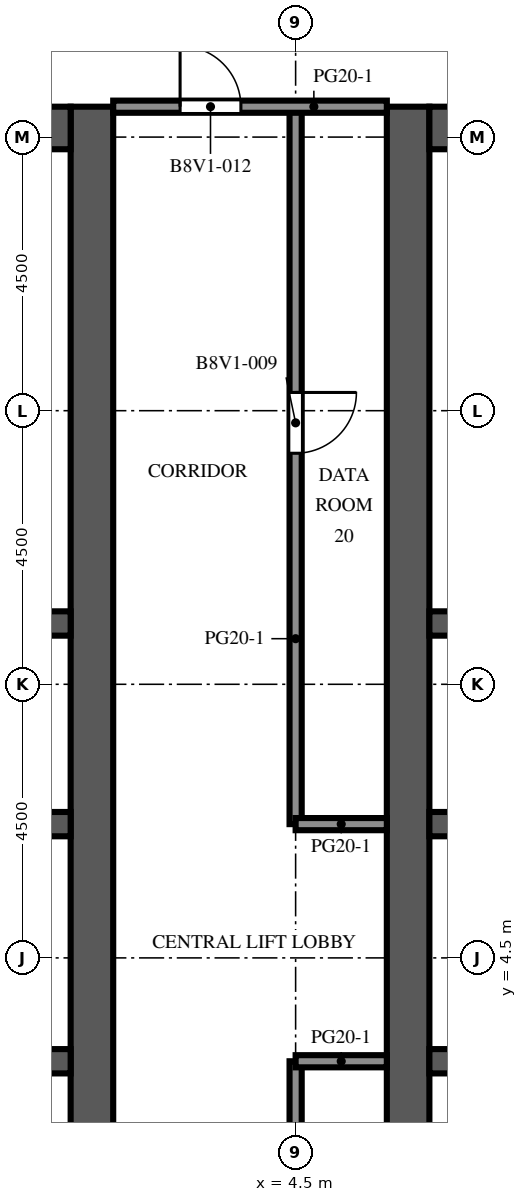
"""IFC4 building model, lengths in metres.
Left out: names, types, materials, properties, quantities, classifications, styles, units other than length and angle.
Written with IfcOpenShell. Run it as: python <this file> out.ifc"""

import sys

from ifc_helpers import new_model, si_unit, direction, frame, frame_2d, origin, place, context, subcontext, project, spatial, rectangle, extrude, element, fill, save


model = new_model("IFC4")
c1 = context("Model", 3, precision=1e-05, world=origin(), true_north=direction((0.0, 1.0)))
c2 = subcontext(c1, "Body", "Model", "MODEL_VIEW")
j1 = project(units=[si_unit("LENGTHUNIT", "METRE"), si_unit("PLANEANGLEUNIT", "RADIAN")], contexts=[c1])
p1 = place(None, origin())
s1 = spatial("IfcSite", under=j1, at=p1, CompositionType="ELEMENT")
p2 = place(p1, origin())
s2 = spatial("IfcBuilding", under=s1, at=p2, CompositionType="ELEMENT")
p3 = place(p2, frame((0.0, 0.0, 274.5)))
s3 = spatial("IfcBuildingStorey", under=s2, at=p3, CompositionType="ELEMENT", Elevation=274.5)
p4 = place(p3, frame((1.15, -9.0, 0.0), z_axis=(0.0, 0.0, 1.0), x_axis=(0.0, 1.0, 0.0)))
e1 = element("IfcWall", 1, at=p4, inside=s3, PredefinedType="SHEAR", context=c2, shape_type="SweptSolid", body=[
    extrude(rectangle(XDim=27.5, YDim=0.7, at=frame_2d((13.75, 0.0))), origin(), (0.0, 0.0, 1.0), 4.1),
])
p5 = place(p4, frame((12.55, 0.0, 0.0)))
e2 = element("IfcOpeningElement", 2, at=p5, cuts=e1, PredefinedType="OPENING", context=c2, shape_type="SweptSolid", body=[
    extrude(rectangle(XDim=2.4, YDim=2.4, at=frame_2d((1.2, 1.2))), frame((0.0, 0.36, 0.0), z_axis=(0.0, -1.0, 0.0), x_axis=(1.0, 0.0, 0.0)), (0.0, 0.0, 1.0), 0.72),
])
p6 = place(p4, frame((3.9, 0.0, 0.0)))
e3 = element("IfcOpeningElement", 3, at=p6, cuts=e1, PredefinedType="OPENING", context=c2, shape_type="SweptSolid", body=[
    extrude(rectangle(XDim=1.2, YDim=2.1, at=frame_2d((0.6, 1.05))), frame((0.0, 0.36, 0.0), z_axis=(0.0, -1.0, 0.0), x_axis=(1.0, 0.0, 0.0)), (0.0, 0.0, 1.0), 0.72),
])
p7 = place(p4, frame((19.46, 0.0, 0.0)))
e4 = element("IfcOpeningElement", 4, at=p7, cuts=e1, PredefinedType="OPENING", context=c2, shape_type="SweptSolid", body=[
    extrude(rectangle(XDim=1.0, YDim=2.1, at=frame_2d((0.5, 1.05))), frame((0.0, 0.36, 0.0), z_axis=(0.0, -1.0, 0.0), x_axis=(1.0, 0.0, 0.0)), (0.0, 0.0, 1.0), 0.72),
])
p8 = place(p4, frame((21.17, 0.0, 0.0)))
e5 = element("IfcOpeningElement", 5, at=p8, cuts=e1, PredefinedType="OPENING", context=c2, shape_type="SweptSolid", body=[
    extrude(rectangle(XDim=1.0, YDim=2.1, at=frame_2d((0.5, 1.05))), frame((0.0, 0.36, 0.0), z_axis=(0.0, -1.0, 0.0), x_axis=(1.0, 0.0, 0.0)), (0.0, 0.0, 1.0), 0.72),
])
p9 = place(p4, frame((23.26, 0.0, 0.0)))
e6 = element("IfcOpeningElement", 6, at=p9, cuts=e1, PredefinedType="OPENING", context=c2, shape_type="SweptSolid", body=[
    extrude(rectangle(XDim=1.0, YDim=2.1, at=frame_2d((0.5, 1.05))), frame((0.0, 0.36, 0.0), z_axis=(0.0, -1.0, 0.0), x_axis=(1.0, 0.0, 0.0)), (0.0, 0.0, 1.0), 0.72),
])
p10 = place(p4, frame((25.35, 0.0, 0.0)))
e7 = element("IfcOpeningElement", 7, at=p10, cuts=e1, PredefinedType="OPENING", context=c2, shape_type="SweptSolid", body=[
    extrude(rectangle(XDim=1.0, YDim=2.1, at=frame_2d((0.5, 1.05))), frame((0.0, 0.36, 0.0), z_axis=(0.0, -1.0, 0.0), x_axis=(1.0, 0.0, 0.0)), (0.0, 0.0, 1.0), 0.72),
])
p11 = place(p3, frame((-9.8, 18.15, 0.0), z_axis=(0.0, 0.0, 1.0), x_axis=(1.0, 0.0, 0.0)))
e8 = element("IfcWall", 8, at=p11, inside=s3, PredefinedType="SHEAR", context=c2, shape_type="SweptSolid", body=[
    extrude(rectangle(XDim=10.6, YDim=0.7, at=frame_2d((5.3, 0.0))), origin(), (0.0, 0.0, 1.0), 4.1),
])
p12 = place(p3, frame((-9.8, 2.8, 0.0), z_axis=(0.0, 0.0, 1.0), x_axis=(1.0, 0.0, 0.0)))
e9 = element("IfcWall", 9, at=p12, inside=s3, PredefinedType="SHEAR", context=c2, shape_type="SweptSolid", body=[
    extrude(rectangle(XDim=10.6, YDim=0.4, at=frame_2d((5.3, 0.0))), origin(), (0.0, 0.0, 1.0), 4.1),
])
p13 = place(p12, frame((0.688, 0.0, 0.0)))
e10 = element("IfcOpeningElement", 10, at=p13, cuts=e9, PredefinedType="OPENING", context=c2, shape_type="SweptSolid", body=[
    extrude(rectangle(XDim=1.1, YDim=2.1, at=frame_2d((0.55, 1.05))), frame((0.0, 0.21, 0.0), z_axis=(0.0, -1.0, 0.0), x_axis=(1.0, 0.0, 0.0)), (0.0, 0.0, 1.0), 0.42),
])
p14 = place(p12, frame((3.438, 0.0, 0.0)))
e11 = element("IfcOpeningElement", 11, at=p14, cuts=e9, PredefinedType="OPENING", context=c2, shape_type="SweptSolid", body=[
    extrude(rectangle(XDim=1.1, YDim=2.1, at=frame_2d((0.55, 1.05))), frame((0.0, 0.21, 0.0), z_axis=(0.0, -1.0, 0.0), x_axis=(1.0, 0.0, 0.0)), (0.0, 0.0, 1.0), 0.42),
])
p15 = place(p12, frame((6.113, 0.0, 0.0)))
e12 = element("IfcOpeningElement", 12, at=p15, cuts=e9, PredefinedType="OPENING", context=c2, shape_type="SweptSolid", body=[
    extrude(rectangle(XDim=1.0, YDim=2.1, at=frame_2d((0.5, 1.05))), frame((0.0, 0.21, 0.0), z_axis=(0.0, -1.0, 0.0), x_axis=(1.0, 0.0, 0.0)), (0.0, 0.0, 1.0), 0.42),
])
p16 = place(p12, frame((8.863, 0.0, 0.0)))
e13 = element("IfcOpeningElement", 13, at=p16, cuts=e9, PredefinedType="OPENING", context=c2, shape_type="SweptSolid", body=[
    extrude(rectangle(XDim=1.0, YDim=2.1, at=frame_2d((0.5, 1.05))), frame((0.0, 0.21, 0.0), z_axis=(0.0, -1.0, 0.0), x_axis=(1.0, 0.0, 0.0)), (0.0, 0.0, 1.0), 0.42),
])
p17 = place(p3, frame((-9.8, 6.7, 0.0), z_axis=(0.0, 0.0, 1.0), x_axis=(1.0, 0.0, 0.0)))
e14 = element("IfcWall", 14, at=p17, inside=s3, PredefinedType="SHEAR", context=c2, shape_type="SweptSolid", body=[
    extrude(rectangle(XDim=10.6, YDim=0.4, at=frame_2d((5.3, 0.0))), origin(), (0.0, 0.0, 1.0), 4.1),
])
p18 = place(p17, frame((3.438, 0.0, 0.0)))
e15 = element("IfcOpeningElement", 15, at=p18, cuts=e14, PredefinedType="OPENING", context=c2, shape_type="SweptSolid", body=[
    extrude(rectangle(XDim=1.1, YDim=2.1, at=frame_2d((0.55, 1.05))), frame((0.0, 0.21, 0.0), z_axis=(0.0, -1.0, 0.0), x_axis=(1.0, 0.0, 0.0)), (0.0, 0.0, 1.0), 0.42),
])
p19 = place(p17, frame((6.062, 0.0, 0.0)))
e16 = element("IfcOpeningElement", 16, at=p19, cuts=e14, PredefinedType="OPENING", context=c2, shape_type="SweptSolid", body=[
    extrude(rectangle(XDim=1.1, YDim=2.1, at=frame_2d((0.55, 1.05))), frame((0.0, 0.21, 0.0), z_axis=(0.0, -1.0, 0.0), x_axis=(1.0, 0.0, 0.0)), (0.0, 0.0, 1.0), 0.42),
])
p20 = place(p17, frame((8.812, 0.0, 0.0)))
e17 = element("IfcOpeningElement", 17, at=p20, cuts=e14, PredefinedType="OPENING", context=c2, shape_type="SweptSolid", body=[
    extrude(rectangle(XDim=1.1, YDim=2.1, at=frame_2d((0.55, 1.05))), frame((0.0, 0.21, 0.0), z_axis=(0.0, -1.0, 0.0), x_axis=(1.0, 0.0, 0.0)), (0.0, 0.0, 1.0), 0.42),
])
p21 = place(p17, frame((0.738, 0.0, 0.0)))
e18 = element("IfcOpeningElement", 18, at=p21, cuts=e14, PredefinedType="OPENING", context=c2, shape_type="SweptSolid", body=[
    extrude(rectangle(XDim=1.0, YDim=2.1, at=frame_2d((0.5, 1.05))), frame((0.0, 0.21, 0.0), z_axis=(0.0, -1.0, 0.0), x_axis=(1.0, 0.0, 0.0)), (0.0, 0.0, 1.0), 0.42),
])
p22 = place(p3, frame((-9.8, 10.0, 0.0), z_axis=(0.0, 0.0, 1.0), x_axis=(1.0, 0.0, 0.0)))
e19 = element("IfcWall", 19, at=p22, inside=s3, PredefinedType="SHEAR", context=c2, shape_type="SweptSolid", body=[
    extrude(rectangle(XDim=10.6, YDim=0.4, at=frame_2d((5.3, 0.0))), origin(), (0.0, 0.0, 1.0), 4.1),
])
p23 = place(p3, frame((6.35, -9.0, 0.0), z_axis=(0.0, 0.0, 1.0), x_axis=(0.0, 1.0, 0.0)))
e20 = element("IfcWall", 20, at=p23, inside=s3, PredefinedType="SHEAR", context=c2, shape_type="SweptSolid", body=[
    extrude(rectangle(XDim=27.5, YDim=0.7, at=frame_2d((13.75, 0.0))), origin(), (0.0, 0.0, 1.0), 4.1),
])
p24 = place(p23, frame((12.55, 0.0, 0.0)))
e21 = element("IfcOpeningElement", 21, at=p24, cuts=e20, PredefinedType="OPENING", context=c2, shape_type="SweptSolid", body=[
    extrude(rectangle(XDim=2.4, YDim=2.4, at=frame_2d((1.2, 1.2))), frame((0.0, 0.36, 0.0), z_axis=(0.0, -1.0, 0.0), x_axis=(1.0, 0.0, 0.0)), (0.0, 0.0, 1.0), 0.72),
])
p25 = place(p23, frame((3.9, 0.0, 0.0)))
e22 = element("IfcOpeningElement", 22, at=p25, cuts=e20, PredefinedType="OPENING", context=c2, shape_type="SweptSolid", body=[
    extrude(rectangle(XDim=1.2, YDim=2.1, at=frame_2d((0.6, 1.05))), frame((0.0, 0.36, 0.0), z_axis=(0.0, -1.0, 0.0), x_axis=(1.0, 0.0, 0.0)), (0.0, 0.0, 1.0), 0.72),
])
p26 = place(p23, frame((19.46, 0.0, 0.0)))
e23 = element("IfcOpeningElement", 23, at=p26, cuts=e20, PredefinedType="OPENING", context=c2, shape_type="SweptSolid", body=[
    extrude(rectangle(XDim=1.0, YDim=2.1, at=frame_2d((0.5, 1.05))), frame((0.0, 0.36, 0.0), z_axis=(0.0, -1.0, 0.0), x_axis=(1.0, 0.0, 0.0)), (0.0, 0.0, 1.0), 0.72),
])
p27 = place(p23, frame((21.17, 0.0, 0.0)))
e24 = element("IfcOpeningElement", 24, at=p27, cuts=e20, PredefinedType="OPENING", context=c2, shape_type="SweptSolid", body=[
    extrude(rectangle(XDim=1.0, YDim=2.1, at=frame_2d((0.5, 1.05))), frame((0.0, 0.36, 0.0), z_axis=(0.0, -1.0, 0.0), x_axis=(1.0, 0.0, 0.0)), (0.0, 0.0, 1.0), 0.72),
])
p28 = place(p23, frame((23.26, 0.0, 0.0)))
e25 = element("IfcOpeningElement", 25, at=p28, cuts=e20, PredefinedType="OPENING", context=c2, shape_type="SweptSolid", body=[
    extrude(rectangle(XDim=1.0, YDim=2.1, at=frame_2d((0.5, 1.05))), frame((0.0, 0.36, 0.0), z_axis=(0.0, -1.0, 0.0), x_axis=(1.0, 0.0, 0.0)), (0.0, 0.0, 1.0), 0.72),
])
p29 = place(p23, frame((25.35, 0.0, 0.0)))
e26 = element("IfcOpeningElement", 26, at=p29, cuts=e20, PredefinedType="OPENING", context=c2, shape_type="SweptSolid", body=[
    extrude(rectangle(XDim=1.0, YDim=2.1, at=frame_2d((0.5, 1.05))), frame((0.0, 0.36, 0.0), z_axis=(0.0, -1.0, 0.0), x_axis=(1.0, 0.0, 0.0)), (0.0, 0.0, 1.0), 0.72),
])
p30 = place(p3, frame((6.7, 18.15, 0.0), z_axis=(0.0, 0.0, 1.0), x_axis=(1.0, 0.0, 0.0)))
e27 = element("IfcWall", 27, at=p30, inside=s3, PredefinedType="SHEAR", context=c2, shape_type="SweptSolid", body=[
    extrude(rectangle(XDim=10.6, YDim=0.7, at=frame_2d((5.3, 0.0))), origin(), (0.0, 0.0, 1.0), 4.1),
])
p31 = place(p3, frame((6.7, 2.8, 0.0), z_axis=(0.0, 0.0, 1.0), x_axis=(1.0, 0.0, 0.0)))
e28 = element("IfcWall", 28, at=p31, inside=s3, PredefinedType="SHEAR", context=c2, shape_type="SweptSolid", body=[
    extrude(rectangle(XDim=10.6, YDim=0.4, at=frame_2d((5.3, 0.0))), origin(), (0.0, 0.0, 1.0), 4.1),
])
p32 = place(p31, frame((0.688, 0.0, 0.0)))
e29 = element("IfcOpeningElement", 29, at=p32, cuts=e28, PredefinedType="OPENING", context=c2, shape_type="SweptSolid", body=[
    extrude(rectangle(XDim=1.1, YDim=2.1, at=frame_2d((0.55, 1.05))), frame((0.0, 0.21, 0.0), z_axis=(0.0, -1.0, 0.0), x_axis=(1.0, 0.0, 0.0)), (0.0, 0.0, 1.0), 0.42),
])
p33 = place(p31, frame((3.438, 0.0, 0.0)))
e30 = element("IfcOpeningElement", 30, at=p33, cuts=e28, PredefinedType="OPENING", context=c2, shape_type="SweptSolid", body=[
    extrude(rectangle(XDim=1.1, YDim=2.1, at=frame_2d((0.55, 1.05))), frame((0.0, 0.21, 0.0), z_axis=(0.0, -1.0, 0.0), x_axis=(1.0, 0.0, 0.0)), (0.0, 0.0, 1.0), 0.42),
])
p34 = place(p31, frame((6.113, 0.0, 0.0)))
e31 = element("IfcOpeningElement", 31, at=p34, cuts=e28, PredefinedType="OPENING", context=c2, shape_type="SweptSolid", body=[
    extrude(rectangle(XDim=1.0, YDim=2.1, at=frame_2d((0.5, 1.05))), frame((0.0, 0.21, 0.0), z_axis=(0.0, -1.0, 0.0), x_axis=(1.0, 0.0, 0.0)), (0.0, 0.0, 1.0), 0.42),
])
p35 = place(p31, frame((8.863, 0.0, 0.0)))
e32 = element("IfcOpeningElement", 32, at=p35, cuts=e28, PredefinedType="OPENING", context=c2, shape_type="SweptSolid", body=[
    extrude(rectangle(XDim=1.0, YDim=2.1, at=frame_2d((0.5, 1.05))), frame((0.0, 0.21, 0.0), z_axis=(0.0, -1.0, 0.0), x_axis=(1.0, 0.0, 0.0)), (0.0, 0.0, 1.0), 0.42),
])
p36 = place(p3, frame((6.7, 6.7, 0.0), z_axis=(0.0, 0.0, 1.0), x_axis=(1.0, 0.0, 0.0)))
e33 = element("IfcWall", 33, at=p36, inside=s3, PredefinedType="SHEAR", context=c2, shape_type="SweptSolid", body=[
    extrude(rectangle(XDim=10.6, YDim=0.4, at=frame_2d((5.3, 0.0))), origin(), (0.0, 0.0, 1.0), 4.1),
])
p37 = place(p36, frame((3.438, 0.0, 0.0)))
e34 = element("IfcOpeningElement", 34, at=p37, cuts=e33, PredefinedType="OPENING", context=c2, shape_type="SweptSolid", body=[
    extrude(rectangle(XDim=1.1, YDim=2.1, at=frame_2d((0.55, 1.05))), frame((0.0, 0.21, 0.0), z_axis=(0.0, -1.0, 0.0), x_axis=(1.0, 0.0, 0.0)), (0.0, 0.0, 1.0), 0.42),
])
p38 = place(p36, frame((6.062, 0.0, 0.0)))
e35 = element("IfcOpeningElement", 35, at=p38, cuts=e33, PredefinedType="OPENING", context=c2, shape_type="SweptSolid", body=[
    extrude(rectangle(XDim=1.1, YDim=2.1, at=frame_2d((0.55, 1.05))), frame((0.0, 0.21, 0.0), z_axis=(0.0, -1.0, 0.0), x_axis=(1.0, 0.0, 0.0)), (0.0, 0.0, 1.0), 0.42),
])
p39 = place(p36, frame((8.812, 0.0, 0.0)))
e36 = element("IfcOpeningElement", 36, at=p39, cuts=e33, PredefinedType="OPENING", context=c2, shape_type="SweptSolid", body=[
    extrude(rectangle(XDim=1.1, YDim=2.1, at=frame_2d((0.55, 1.05))), frame((0.0, 0.21, 0.0), z_axis=(0.0, -1.0, 0.0), x_axis=(1.0, 0.0, 0.0)), (0.0, 0.0, 1.0), 0.42),
])
p40 = place(p36, frame((0.738, 0.0, 0.0)))
e37 = element("IfcOpeningElement", 37, at=p40, cuts=e33, PredefinedType="OPENING", context=c2, shape_type="SweptSolid", body=[
    extrude(rectangle(XDim=1.0, YDim=2.1, at=frame_2d((0.5, 1.05))), frame((0.0, 0.21, 0.0), z_axis=(0.0, -1.0, 0.0), x_axis=(1.0, 0.0, 0.0)), (0.0, 0.0, 1.0), 0.42),
])
p41 = place(p3, frame((6.7, 10.0, 0.0), z_axis=(0.0, 0.0, 1.0), x_axis=(1.0, 0.0, 0.0)))
e38 = element("IfcWall", 38, at=p41, inside=s3, PredefinedType="SHEAR", context=c2, shape_type="SweptSolid", body=[
    extrude(rectangle(XDim=10.6, YDim=0.4, at=frame_2d((5.3, 0.0))), origin(), (0.0, 0.0, 1.0), 4.1),
])
for number, where, z_axis, x_axis in (
    (39, (-4.3, 11.72, 0.0), (0.0, 0.0, 1.0), (1.0, 0.0, 0.0)),
    (40, (-4.3, 13.62, 0.0), (0.0, 0.0, 1.0), (1.0, 0.0, 0.0)),
    (41, (-4.3, 15.9, 0.0), (0.0, 0.0, 1.0), (1.0, 0.0, 0.0)),
    (42, (6.7, 11.72, 0.0), (0.0, 0.0, 1.0), (1.0, 0.0, 0.0)),
    (43, (6.7, 13.62, 0.0), (0.0, 0.0, 1.0), (1.0, 0.0, 0.0)),
    (44, (6.7, 15.9, 0.0), (0.0, 0.0, 1.0), (1.0, 0.0, 0.0)),
):
    element("IfcWall", number, at=place(p3, frame(where, z_axis=z_axis, x_axis=x_axis)), inside=s3, PredefinedType="PARTITIONING", context=c2, shape_type="SweptSolid", body=[
        extrude(rectangle(XDim=5.1, YDim=0.1, at=frame_2d((2.55, 0.0))), origin(), (0.0, 0.0, 1.0), 3.65),
    ])
p42 = place(p3, frame((4.5, 2.8, 0.0), z_axis=(0.0, 0.0, 1.0), x_axis=(0.0, -1.0, 0.0)))
e45 = element("IfcWall", 45, at=p42, inside=s3, PredefinedType="PARTITIONING", context=c2, shape_type="SweptSolid", body=[
    extrude(rectangle(XDim=6.3, YDim=0.2, at=frame_2d((3.15, 0.0))), origin(), (0.0, 0.0, 1.0), 3.65),
])
p43 = place(p42, frame((2.45, 0.0, 0.0)))
e46 = element("IfcOpeningElement", 46, at=p43, cuts=e45, PredefinedType="OPENING", context=c2, shape_type="SweptSolid", body=[
    extrude(rectangle(XDim=1.0, YDim=2.1, at=frame_2d((0.5, 1.05))), frame((0.0, 0.11, 0.0), z_axis=(0.0, -1.0, 0.0), x_axis=(1.0, 0.0, 0.0)), (0.0, 0.0, 1.0), 0.22),
])
p44 = place(p3, frame((4.5, 18.5, 0.0), z_axis=(0.0, 0.0, 1.0), x_axis=(0.0, -1.0, 0.0)))
e47 = element("IfcWall", 47, at=p44, inside=s3, PredefinedType="PARTITIONING", context=c2, shape_type="SweptSolid", body=[
    extrude(rectangle(XDim=11.8, YDim=0.2, at=frame_2d((5.9, 0.0))), origin(), (0.0, 0.0, 1.0), 3.65),
])
p45 = place(p44, frame((4.7, 0.0, 0.0)))
e48 = element("IfcOpeningElement", 48, at=p45, cuts=e47, PredefinedType="OPENING", context=c2, shape_type="SweptSolid", body=[
    extrude(rectangle(XDim=1.0, YDim=2.1, at=frame_2d((0.5, 1.05))), frame((0.0, 0.11, 0.0), z_axis=(0.0, -1.0, 0.0), x_axis=(1.0, 0.0, 0.0)), (0.0, 0.0, 1.0), 0.22),
])
for number, where, z_axis, x_axis in (
    (49, (4.5, 2.8, 0.0), (0.0, 0.0, 1.0), (1.0, 0.0, 0.0)),
    (50, (4.5, 6.7, 0.0), (0.0, 0.0, 1.0), (1.0, 0.0, 0.0)),
):
    element("IfcWall", number, at=place(p3, frame(where, z_axis=z_axis, x_axis=x_axis)), inside=s3, PredefinedType="PARTITIONING", context=c2, shape_type="SweptSolid", body=[
        extrude(rectangle(XDim=1.5, YDim=0.2, at=frame_2d((0.75, 0.0))), origin(), (0.0, 0.0, 1.0), 3.65),
    ])
p46 = place(p3, frame((1.5, 18.5, 0.0), z_axis=(0.0, 0.0, 1.0), x_axis=(1.0, 0.0, 0.0)))
e51 = element("IfcWall", 51, at=p46, inside=s3, PredefinedType="PARTITIONING", context=c2, shape_type="SweptSolid", body=[
    extrude(rectangle(XDim=4.5, YDim=0.2, at=frame_2d((2.25, 0.0))), origin(), (0.0, 0.0, 1.0), 3.65),
])
p47 = place(p46, frame((1.1, 0.0, 0.0)))
e52 = element("IfcOpeningElement", 52, at=p47, cuts=e51, PredefinedType="OPENING", context=c2, shape_type="SweptSolid", body=[
    extrude(rectangle(XDim=1.0, YDim=2.1, at=frame_2d((0.5, 1.05))), frame((0.0, 0.11, 0.0), z_axis=(0.0, -1.0, 0.0), x_axis=(1.0, 0.0, 0.0)), (0.0, 0.0, 1.0), 0.22),
])
p48 = place(p5, origin())
e53 = element("IfcDoor", 53, at=p48, inside=s3, OperationType="DOUBLE_DOOR_DOUBLE_SWING", PredefinedType="DOOR", context=c2, shape_type="SweptSolid", body=[
    extrude(rectangle(XDim=2.4, YDim=2.4, at=frame_2d((1.2, 1.2))), frame((0.0, 0.025, 0.0), z_axis=(0.0, -1.0, 0.0), x_axis=(1.0, 0.0, 0.0)), (0.0, 0.0, 1.0), 0.05),
])
fill(e2, e53)
p49 = place(p24, origin())
e54 = element("IfcDoor", 54, at=p49, inside=s3, OperationType="DOUBLE_DOOR_DOUBLE_SWING", PredefinedType="DOOR", context=c2, shape_type="SweptSolid", body=[
    extrude(rectangle(XDim=2.4, YDim=2.4, at=frame_2d((1.2, 1.2))), frame((0.0, 0.025, 0.0), z_axis=(0.0, -1.0, 0.0), x_axis=(1.0, 0.0, 0.0)), (0.0, 0.0, 1.0), 0.05),
])
fill(e21, e54)
p50 = place(p7, origin())
e55 = element("IfcDoor", 55, at=p50, inside=s3, OperationType="SINGLE_SWING_LEFT", PredefinedType="DOOR", context=c2, shape_type="SweptSolid", body=[
    extrude(rectangle(XDim=1.0, YDim=2.1, at=frame_2d((0.5, 1.05))), frame((0.0, 0.325, 0.0), z_axis=(0.0, -1.0, 0.0), x_axis=(1.0, 0.0, 0.0)), (0.0, 0.0, 1.0), 0.05),
])
fill(e4, e55)
p51 = place(p8, origin())
e56 = element("IfcDoor", 56, at=p51, inside=s3, OperationType="SINGLE_SWING_RIGHT", PredefinedType="DOOR", context=c2, shape_type="SweptSolid", body=[
    extrude(rectangle(XDim=1.0, YDim=2.1, at=frame_2d((0.5, 1.05))), frame((0.0, 0.325, 0.0), z_axis=(0.0, -1.0, 0.0), x_axis=(1.0, 0.0, 0.0)), (0.0, 0.0, 1.0), 0.05),
])
fill(e5, e56)
p52 = place(p9, origin())
e57 = element("IfcDoor", 57, at=p52, inside=s3, OperationType="SINGLE_SWING_LEFT", PredefinedType="DOOR", context=c2, shape_type="SweptSolid", body=[
    extrude(rectangle(XDim=1.0, YDim=2.1, at=frame_2d((0.5, 1.05))), frame((0.0, 0.325, 0.0), z_axis=(0.0, -1.0, 0.0), x_axis=(1.0, 0.0, 0.0)), (0.0, 0.0, 1.0), 0.05),
])
fill(e6, e57)
p53 = place(p10, origin())
e58 = element("IfcDoor", 58, at=p53, inside=s3, OperationType="SINGLE_SWING_RIGHT", PredefinedType="DOOR", context=c2, shape_type="SweptSolid", body=[
    extrude(rectangle(XDim=1.0, YDim=2.1, at=frame_2d((0.5, 1.05))), frame((0.0, 0.325, 0.0), z_axis=(0.0, -1.0, 0.0), x_axis=(1.0, 0.0, 0.0)), (0.0, 0.0, 1.0), 0.05),
])
fill(e7, e58)
p54 = place(p26, origin())
e59 = element("IfcDoor", 59, at=p54, inside=s3, OperationType="SINGLE_SWING_RIGHT", PredefinedType="DOOR", context=c2, shape_type="SweptSolid", body=[
    extrude(rectangle(XDim=1.0, YDim=2.1, at=frame_2d((0.5, 1.05))), frame((0.0, -0.275, 0.0), z_axis=(0.0, -1.0, 0.0), x_axis=(1.0, 0.0, 0.0)), (0.0, 0.0, 1.0), 0.05),
])
fill(e23, e59)
p55 = place(p27, origin())
e60 = element("IfcDoor", 60, at=p55, inside=s3, OperationType="SINGLE_SWING_LEFT", PredefinedType="DOOR", context=c2, shape_type="SweptSolid", body=[
    extrude(rectangle(XDim=1.0, YDim=2.1, at=frame_2d((0.5, 1.05))), frame((0.0, -0.275, 0.0), z_axis=(0.0, -1.0, 0.0), x_axis=(1.0, 0.0, 0.0)), (0.0, 0.0, 1.0), 0.05),
])
fill(e24, e60)
p56 = place(p28, origin())
e61 = element("IfcDoor", 61, at=p56, inside=s3, OperationType="SINGLE_SWING_RIGHT", PredefinedType="DOOR", context=c2, shape_type="SweptSolid", body=[
    extrude(rectangle(XDim=1.0, YDim=2.1, at=frame_2d((0.5, 1.05))), frame((0.0, -0.275, 0.0), z_axis=(0.0, -1.0, 0.0), x_axis=(1.0, 0.0, 0.0)), (0.0, 0.0, 1.0), 0.05),
])
fill(e25, e61)
p57 = place(p29, origin())
e62 = element("IfcDoor", 62, at=p57, inside=s3, OperationType="SINGLE_SWING_LEFT", PredefinedType="DOOR", context=c2, shape_type="SweptSolid", body=[
    extrude(rectangle(XDim=1.0, YDim=2.1, at=frame_2d((0.5, 1.05))), frame((0.0, -0.275, 0.0), z_axis=(0.0, -1.0, 0.0), x_axis=(1.0, 0.0, 0.0)), (0.0, 0.0, 1.0), 0.05),
])
fill(e26, e62)
p58 = place(p45, origin())
e63 = element("IfcDoor", 63, at=p58, inside=s3, OperationType="SINGLE_SWING_LEFT", PredefinedType="DOOR", context=c2, shape_type="SweptSolid", body=[
    extrude(rectangle(XDim=1.0, YDim=2.1, at=frame_2d((0.5, 1.05))), frame((0.0, 0.025, 0.0), z_axis=(0.0, -1.0, 0.0), x_axis=(1.0, 0.0, 0.0)), (0.0, 0.0, 1.0), 0.05),
])
fill(e48, e63)
p59 = place(p47, origin())
e64 = element("IfcDoor", 64, at=p59, inside=s3, OperationType="SINGLE_SWING_LEFT", PredefinedType="DOOR", context=c2, shape_type="SweptSolid", body=[
    extrude(rectangle(XDim=1.0, YDim=2.1, at=frame_2d((0.5, 1.05))), frame((0.0, 0.025, 0.0), z_axis=(0.0, -1.0, 0.0), x_axis=(1.0, 0.0, 0.0)), (0.0, 0.0, 1.0), 0.05),
])
fill(e52, e64)
save(model, sys.argv[1])
